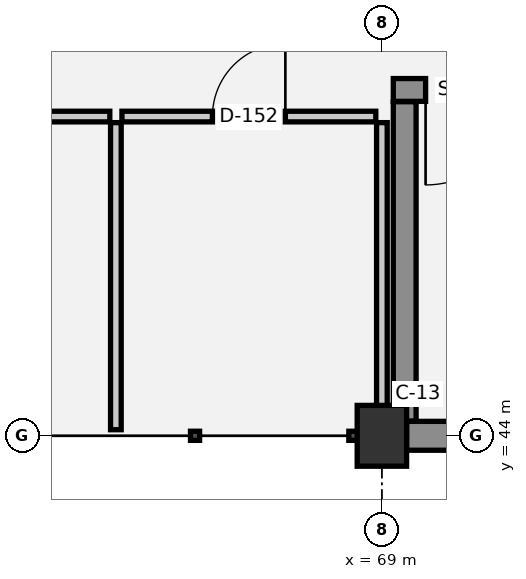
"""IFC4 building model, lengths in metres.
Left out: names, types, materials, properties, quantities, classifications, styles, units other than length and angle.
Written with IfcOpenShell. Run it as: python <this file> out.ifc"""

import sys

from ifc_helpers import new_model, si_unit, direction, frame, frame_2d, origin, origin_2d, place, context, subcontext, project, spatial, rectangle, extrude, element, fill, save


model = new_model("IFC4")
c1 = context("Model", 3, precision=1e-05, world=origin(), true_north=direction((0.0, 1.0)))
c2 = subcontext(c1, "Body", "Model", "MODEL_VIEW")
j1 = project(units=[si_unit("LENGTHUNIT", "METRE"), si_unit("PLANEANGLEUNIT", "RADIAN")], contexts=[c1])
p1 = place(None, origin())
s1 = spatial("IfcSite", under=j1, at=p1, CompositionType="ELEMENT")
p2 = place(p1, origin())
s2 = spatial("IfcBuilding", under=s1, at=p2, CompositionType="ELEMENT")
p3 = place(p2, frame((0.0, 0.0, 18.3)))
s3 = spatial("IfcBuildingStorey", under=s2, at=p3, CompositionType="ELEMENT", Elevation=18.3)
p4 = place(p3, frame((69.0, 44.0, 0.0), z_axis=(0.0, 0.0, 1.0), x_axis=(1.0, 0.0, 0.0)))
e1 = element("IfcColumn", 1, at=p4, inside=s3, PredefinedType="COLUMN", context=c2, shape_type="SweptSolid", body=[
    extrude(rectangle(XDim=0.65, YDim=0.8, at=origin_2d()), origin(), (0.0, 0.0, 1.0), 3.75),
])
p5 = place(p3, frame((76.675, 44.0, 0.0), z_axis=(0.0, 0.0, 1.0), x_axis=(-1.0, 0.0, 0.0)))
e2 = element("IfcWall", 2, at=p5, inside=s3, PredefinedType="STANDARD", context=c2, shape_type="SweptSolid", body=[
    extrude(rectangle(XDim=7.35, YDim=0.38, at=frame_2d((3.675, 0.0))), origin(), (0.0, 0.0, 1.0), 2.6),
])
p6 = place(p3, frame((76.85, 48.55, 0.0), z_axis=(0.0, 0.0, 1.0), x_axis=(-1.0, 0.0, 0.0)))
e3 = element("IfcWall", 3, at=p6, inside=s3, PredefinedType="SHEAR", context=c2, shape_type="SweptSolid", body=[
    extrude(rectangle(XDim=7.7, YDim=0.3, at=frame_2d((3.85, 0.0))), origin(), (0.0, 0.0, 1.0), 3.47),
])
p7 = place(p6, frame((6.025, 0.0, 0.0)))
e4 = element("IfcOpeningElement", 4, at=p7, cuts=e3, PredefinedType="OPENING", context=c2, shape_type="SweptSolid", body=[
    extrude(rectangle(XDim=1.25, YDim=2.15, at=frame_2d((0.625, 1.075))), frame((0.0, 0.16, 0.0), z_axis=(0.0, -1.0, 0.0), x_axis=(1.0, 0.0, 0.0)), (0.0, 0.0, 1.0), 0.32),
])
p8 = place(p3, frame((69.3, 48.395, 0.0), z_axis=(0.0, 0.0, 1.0), x_axis=(0.0, -1.0, 0.0)))
e5 = element("IfcWall", 5, at=p8, inside=s3, PredefinedType="SHEAR", context=c2, shape_type="SweptSolid", body=[
    extrude(rectangle(XDim=4.2, YDim=0.3, at=frame_2d((2.1, 0.0))), origin(), (0.0, 0.0, 1.0), 3.47),
])
p9 = place(p3, frame((62.08, 48.2, 0.0), z_axis=(0.0, 0.0, 1.0), x_axis=(1.0, 0.0, 0.0)))
e6 = element("IfcWall", 6, at=p9, inside=s3, PredefinedType="PLUMBINGWALL", context=c2, shape_type="SweptSolid", body=[
    extrude(rectangle(XDim=3.34, YDim=0.14, at=frame_2d((1.67, 0.0))), origin(), (0.0, 0.0, 1.0), 3.39),
])
p10 = place(p9, frame((1.21, 0.0, 0.0)))
e7 = element("IfcOpeningElement", 7, at=p10, cuts=e6, PredefinedType="OPENING", context=c2, shape_type="SweptSolid", body=[
    extrude(rectangle(XDim=0.92, YDim=2.1, at=frame_2d((0.46, 1.05))), frame((0.0, 0.08, 0.0), z_axis=(0.0, -1.0, 0.0), x_axis=(1.0, 0.0, 0.0)), (0.0, 0.0, 1.0), 0.16),
])
p11 = place(p3, frame((65.58, 48.2, 0.0), z_axis=(0.0, 0.0, 1.0), x_axis=(1.0, 0.0, 0.0)))
e8 = element("IfcWall", 8, at=p11, inside=s3, PredefinedType="PLUMBINGWALL", context=c2, shape_type="SweptSolid", body=[
    extrude(rectangle(XDim=3.34, YDim=0.14, at=frame_2d((1.67, 0.0))), origin(), (0.0, 0.0, 1.0), 3.39),
])
p12 = place(p11, frame((1.19, 0.0, 0.0)))
e9 = element("IfcOpeningElement", 9, at=p12, cuts=e8, PredefinedType="OPENING", context=c2, shape_type="SweptSolid", body=[
    extrude(rectangle(XDim=0.96, YDim=2.1, at=frame_2d((0.48, 1.05))), frame((0.0, 0.08, 0.0), z_axis=(0.0, -1.0, 0.0), x_axis=(1.0, 0.0, 0.0)), (0.0, 0.0, 1.0), 0.16),
])
p13 = place(p3, frame((65.5, 44.08, 0.0), z_axis=(0.0, 0.0, 1.0), x_axis=(0.0, 1.0, 0.0)))
e10 = element("IfcWall", 10, at=p13, inside=s3, PredefinedType="PLUMBINGWALL", context=c2, shape_type="SweptSolid", body=[
    extrude(rectangle(XDim=4.04, YDim=0.14, at=frame_2d((2.02, 0.0))), origin(), (0.0, 0.0, 1.0), 3.39),
])
p14 = place(p3, frame((69.0, 44.08, 0.0), z_axis=(0.0, 0.0, 1.0), x_axis=(0.0, 1.0, 0.0)))
e11 = element("IfcWall", 11, at=p14, inside=s3, PredefinedType="PLUMBINGWALL", context=c2, shape_type="SweptSolid", body=[
    extrude(rectangle(XDim=4.04, YDim=0.14, at=frame_2d((2.02, 0.0))), origin(), (0.0, 0.0, 1.0), 2.92),
])
p15 = place(p7, origin())
e12 = element("IfcDoor", 12, at=p15, inside=s3, OperationType="SINGLE_SWING_RIGHT", PredefinedType="DOOR", context=c2, shape_type="SweptSolid", body=[
    extrude(rectangle(XDim=1.25, YDim=2.15, at=frame_2d((0.625, 1.075))), frame((0.0, 0.025, 0.0), z_axis=(0.0, -1.0, 0.0), x_axis=(1.0, 0.0, 0.0)), (0.0, 0.0, 1.0), 0.05),
])
fill(e4, e12)
p16 = place(p12, origin())
e13 = element("IfcDoor", 13, at=p16, inside=s3, OperationType="SINGLE_SWING_RIGHT", PredefinedType="DOOR", context=c2, shape_type="SweptSolid", body=[
    extrude(rectangle(XDim=0.96, YDim=2.1, at=frame_2d((0.48, 1.05))), frame((0.0, 0.025, 0.0), z_axis=(0.0, -1.0, 0.0), x_axis=(1.0, 0.0, 0.0)), (0.0, 0.0, 1.0), 0.05),
])
fill(e9, e13)
save(model, sys.argv[1])
